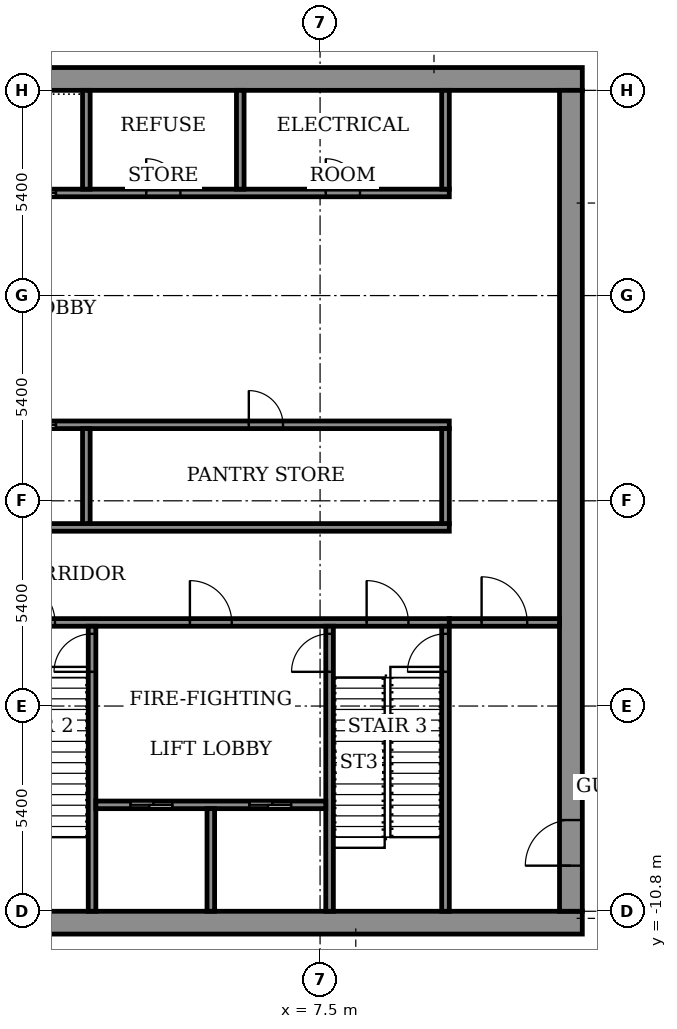
"""IFC4 building model, lengths in metres.
Left out: names, types, materials, properties, quantities, classifications, styles, units other than length and angle.
Written with IfcOpenShell. Run it as: python <this file> out.ifc"""

import sys

from ifc_helpers import new_model, si_unit, direction, frame, frame_2d, origin, place, context, subcontext, project, spatial, rectangle, extrude, element, fill, save


model = new_model("IFC4")
c1 = context("Model", 3, precision=1e-05, world=origin(), true_north=direction((0.0, 1.0)))
c2 = subcontext(c1, "Body", "Model", "MODEL_VIEW")
j1 = project(units=[si_unit("LENGTHUNIT", "METRE"), si_unit("PLANEANGLEUNIT", "RADIAN")], contexts=[c1])
p1 = place(None, origin())
s1 = spatial("IfcSite", under=j1, at=p1, CompositionType="ELEMENT")
p2 = place(p1, origin())
s2 = spatial("IfcBuilding", under=s1, at=p2, CompositionType="ELEMENT")
p3 = place(p2, frame((0.0, 0.0, 324.1)))
s3 = spatial("IfcBuildingStorey", under=s2, at=p3, CompositionType="ELEMENT", Elevation=324.1)
for number, where, z_axis, x_axis in (
    (1, (-14.4, -11.1, 0.0), (0.0, 0.0, 1.0), (1.0, 0.0, 0.0)),
    (2, (-14.4, 11.1, 0.0), (0.0, 0.0, 1.0), (1.0, 0.0, 0.0)),
):
    element("IfcWall", number, at=place(p3, frame(where, z_axis=z_axis, x_axis=x_axis)), inside=s3, PredefinedType="SHEAR", context=c2, shape_type="SweptSolid", body=[
        extrude(rectangle(XDim=28.8, YDim=0.6, at=frame_2d((14.4, 0.0))), origin(), (0.0, 0.0, 1.0), 5.6),
    ])
p4 = place(p3, frame((14.1, -10.8, 0.0), z_axis=(0.0, 0.0, 1.0), x_axis=(0.0, 1.0, 0.0)))
e3 = element("IfcWall", 3, at=p4, inside=s3, PredefinedType="SHEAR", context=c2, shape_type="SweptSolid", body=[
    extrude(rectangle(XDim=21.6, YDim=0.6, at=frame_2d((10.8, 0.0))), origin(), (0.0, 0.0, 1.0), 5.6),
])
p5 = place(p4, frame((1.2, 0.0, 0.0)))
e4 = element("IfcOpeningElement", 4, at=p5, cuts=e3, PredefinedType="OPENING", context=c2, shape_type="SweptSolid", body=[
    extrude(rectangle(XDim=1.2, YDim=2.1, at=frame_2d((0.6, 1.05))), frame((0.0, 0.31, 0.0), z_axis=(0.0, -1.0, 0.0), x_axis=(1.0, 0.0, 0.0)), (0.0, 0.0, 1.0), 0.62),
])
p6 = place(p3, frame((-10.9, -3.2, 0.0), z_axis=(0.0, 0.0, 1.0), x_axis=(1.0, 0.0, 0.0)))
e5 = element("IfcWall", 5, at=p6, inside=s3, PredefinedType="SHEAR", context=c2, shape_type="SweptSolid", body=[
    extrude(rectangle(XDim=21.8, YDim=0.2, at=frame_2d((10.9, 0.0))), origin(), (0.0, 0.0, 1.0), 5.05),
])
p7 = place(p6, frame((1.075, 0.0, 0.0)))
e6 = element("IfcOpeningElement", 6, at=p7, cuts=e5, PredefinedType="OPENING", context=c2, shape_type="SweptSolid", body=[
    extrude(rectangle(XDim=1.1, YDim=2.1, at=frame_2d((0.55, 1.05))), frame((0.0, 0.11, 0.0), z_axis=(0.0, -1.0, 0.0), x_axis=(1.0, 0.0, 0.0)), (0.0, 0.0, 1.0), 0.22),
])
p8 = place(p6, frame((10.325, 0.0, 0.0)))
e7 = element("IfcOpeningElement", 7, at=p8, cuts=e5, PredefinedType="OPENING", context=c2, shape_type="SweptSolid", body=[
    extrude(rectangle(XDim=1.1, YDim=2.1, at=frame_2d((0.55, 1.05))), frame((0.0, 0.11, 0.0), z_axis=(0.0, -1.0, 0.0), x_axis=(1.0, 0.0, 0.0)), (0.0, 0.0, 1.0), 0.22),
])
p9 = place(p6, frame((19.625, 0.0, 0.0)))
e8 = element("IfcOpeningElement", 8, at=p9, cuts=e5, PredefinedType="OPENING", context=c2, shape_type="SweptSolid", body=[
    extrude(rectangle(XDim=1.1, YDim=2.1, at=frame_2d((0.55, 1.05))), frame((0.0, 0.11, 0.0), z_axis=(0.0, -1.0, 0.0), x_axis=(1.0, 0.0, 0.0)), (0.0, 0.0, 1.0), 0.22),
])
p10 = place(p6, frame((5.7, 0.0, 0.0)))
e9 = element("IfcOpeningElement", 9, at=p10, cuts=e5, PredefinedType="OPENING", context=c2, shape_type="SweptSolid", body=[
    extrude(rectangle(XDim=1.1, YDim=2.1, at=frame_2d((0.55, 1.05))), frame((0.0, 0.11, 0.0), z_axis=(0.0, -1.0, 0.0), x_axis=(1.0, 0.0, 0.0)), (0.0, 0.0, 1.0), 0.22),
])
p11 = place(p6, frame((14.975, 0.0, 0.0)))
e10 = element("IfcOpeningElement", 10, at=p11, cuts=e5, PredefinedType="OPENING", context=c2, shape_type="SweptSolid", body=[
    extrude(rectangle(XDim=1.1, YDim=2.1, at=frame_2d((0.55, 1.05))), frame((0.0, 0.11, 0.0), z_axis=(0.0, -1.0, 0.0), x_axis=(1.0, 0.0, 0.0)), (0.0, 0.0, 1.0), 0.22),
])
p12 = place(p3, frame((-10.9, -0.7, 0.0), z_axis=(0.0, 0.0, 1.0), x_axis=(1.0, 0.0, 0.0)))
e11 = element("IfcWall", 11, at=p12, inside=s3, PredefinedType="SHEAR", context=c2, shape_type="SweptSolid", body=[
    extrude(rectangle(XDim=21.8, YDim=0.2, at=frame_2d((10.9, 0.0))), origin(), (0.0, 0.0, 1.0), 5.05),
])
p13 = place(p3, frame((-10.9, 2.0, 0.0), z_axis=(0.0, 0.0, 1.0), x_axis=(1.0, 0.0, 0.0)))
e12 = element("IfcWall", 12, at=p13, inside=s3, PredefinedType="SHEAR", context=c2, shape_type="SweptSolid", body=[
    extrude(rectangle(XDim=21.8, YDim=0.2, at=frame_2d((10.9, 0.0))), origin(), (0.0, 0.0, 1.0), 5.05),
])
p14 = place(p13, frame((4.95, 0.0, 0.0)))
e13 = element("IfcOpeningElement", 13, at=p14, cuts=e12, PredefinedType="OPENING", context=c2, shape_type="SweptSolid", body=[
    extrude(rectangle(XDim=1.1, YDim=2.1, at=frame_2d((0.55, 1.05))), frame((0.0, 0.11, 0.0), z_axis=(0.0, -1.0, 0.0), x_axis=(1.0, 0.0, 0.0)), (0.0, 0.0, 1.0), 0.22),
])
p15 = place(p13, frame((7.65, 0.0, 0.0)))
e14 = element("IfcOpeningElement", 14, at=p15, cuts=e12, PredefinedType="OPENING", context=c2, shape_type="SweptSolid", body=[
    extrude(rectangle(XDim=1.1, YDim=2.1, at=frame_2d((0.55, 1.05))), frame((0.0, 0.11, 0.0), z_axis=(0.0, -1.0, 0.0), x_axis=(1.0, 0.0, 0.0)), (0.0, 0.0, 1.0), 0.22),
])
p16 = place(p13, frame((10.35, 0.0, 0.0)))
e15 = element("IfcOpeningElement", 15, at=p16, cuts=e12, PredefinedType="OPENING", context=c2, shape_type="SweptSolid", body=[
    extrude(rectangle(XDim=1.1, YDim=2.1, at=frame_2d((0.55, 1.05))), frame((0.0, 0.11, 0.0), z_axis=(0.0, -1.0, 0.0), x_axis=(1.0, 0.0, 0.0)), (0.0, 0.0, 1.0), 0.22),
])
p17 = place(p13, frame((1.675, 0.0, 0.0)))
e16 = element("IfcOpeningElement", 16, at=p17, cuts=e12, PredefinedType="OPENING", context=c2, shape_type="SweptSolid", body=[
    extrude(rectangle(XDim=0.9, YDim=2.1, at=frame_2d((0.45, 1.05))), frame((0.0, 0.11, 0.0), z_axis=(0.0, -1.0, 0.0), x_axis=(1.0, 0.0, 0.0)), (0.0, 0.0, 1.0), 0.22),
])
p18 = place(p13, frame((16.525, 0.0, 0.0)))
e17 = element("IfcOpeningElement", 17, at=p18, cuts=e12, PredefinedType="OPENING", context=c2, shape_type="SweptSolid", body=[
    extrude(rectangle(XDim=0.9, YDim=2.1, at=frame_2d((0.45, 1.05))), frame((0.0, 0.11, 0.0), z_axis=(0.0, -1.0, 0.0), x_axis=(1.0, 0.0, 0.0)), (0.0, 0.0, 1.0), 0.22),
])
p19 = place(p3, frame((-10.9, 8.1, 0.0), z_axis=(0.0, 0.0, 1.0), x_axis=(1.0, 0.0, 0.0)))
e18 = element("IfcWall", 18, at=p19, inside=s3, PredefinedType="SHEAR", context=c2, shape_type="SweptSolid", body=[
    extrude(rectangle(XDim=21.8, YDim=0.2, at=frame_2d((10.9, 0.0))), origin(), (0.0, 0.0, 1.0), 5.05),
])
p20 = place(p19, frame((4.95, 0.0, 0.0)))
e19 = element("IfcOpeningElement", 19, at=p20, cuts=e18, PredefinedType="OPENING", context=c2, shape_type="SweptSolid", body=[
    extrude(rectangle(XDim=1.1, YDim=2.1, at=frame_2d((0.55, 1.05))), frame((0.0, 0.11, 0.0), z_axis=(0.0, -1.0, 0.0), x_axis=(1.0, 0.0, 0.0)), (0.0, 0.0, 1.0), 0.22),
])
p21 = place(p19, frame((7.65, 0.0, 0.0)))
e20 = element("IfcOpeningElement", 20, at=p21, cuts=e18, PredefinedType="OPENING", context=c2, shape_type="SweptSolid", body=[
    extrude(rectangle(XDim=1.1, YDim=2.1, at=frame_2d((0.55, 1.05))), frame((0.0, 0.11, 0.0), z_axis=(0.0, -1.0, 0.0), x_axis=(1.0, 0.0, 0.0)), (0.0, 0.0, 1.0), 0.22),
])
p22 = place(p19, frame((10.35, 0.0, 0.0)))
e21 = element("IfcOpeningElement", 21, at=p22, cuts=e18, PredefinedType="OPENING", context=c2, shape_type="SweptSolid", body=[
    extrude(rectangle(XDim=1.1, YDim=2.1, at=frame_2d((0.55, 1.05))), frame((0.0, 0.11, 0.0), z_axis=(0.0, -1.0, 0.0), x_axis=(1.0, 0.0, 0.0)), (0.0, 0.0, 1.0), 0.22),
])
p23 = place(p19, frame((1.675, 0.0, 0.0)))
e22 = element("IfcOpeningElement", 22, at=p23, cuts=e18, PredefinedType="OPENING", context=c2, shape_type="SweptSolid", body=[
    extrude(rectangle(XDim=0.9, YDim=2.1, at=frame_2d((0.45, 1.05))), frame((0.0, 0.11, 0.0), z_axis=(0.0, -1.0, 0.0), x_axis=(1.0, 0.0, 0.0)), (0.0, 0.0, 1.0), 0.22),
])
p24 = place(p19, frame((13.825, 0.0, 0.0)))
e23 = element("IfcOpeningElement", 23, at=p24, cuts=e18, PredefinedType="OPENING", context=c2, shape_type="SweptSolid", body=[
    extrude(rectangle(XDim=0.9, YDim=2.1, at=frame_2d((0.45, 1.05))), frame((0.0, 0.11, 0.0), z_axis=(0.0, -1.0, 0.0), x_axis=(1.0, 0.0, 0.0)), (0.0, 0.0, 1.0), 0.22),
])
p25 = place(p19, frame((18.55, 0.0, 0.0)))
e24 = element("IfcOpeningElement", 24, at=p25, cuts=e18, PredefinedType="OPENING", context=c2, shape_type="SweptSolid", body=[
    extrude(rectangle(XDim=0.9, YDim=2.1, at=frame_2d((0.45, 1.05))), frame((0.0, 0.11, 0.0), z_axis=(0.0, -1.0, 0.0), x_axis=(1.0, 0.0, 0.0)), (0.0, 0.0, 1.0), 0.22),
])
p26 = place(p3, frame((1.5, -10.8, 0.0), z_axis=(0.0, 0.0, 1.0), x_axis=(0.0, 1.0, 0.0)))
e25 = element("IfcWall", 25, at=p26, inside=s3, PredefinedType="SHEAR", context=c2, shape_type="SweptSolid", body=[
    extrude(rectangle(XDim=7.5, YDim=0.2, at=frame_2d((3.75, 0.0))), origin(), (0.0, 0.0, 1.0), 5.05),
])
p27 = place(p26, frame((6.3, 0.0, 0.0)))
e26 = element("IfcOpeningElement", 26, at=p27, cuts=e25, PredefinedType="OPENING", context=c2, shape_type="SweptSolid", body=[
    extrude(rectangle(XDim=1.0, YDim=2.1, at=frame_2d((0.5, 1.05))), frame((0.0, 0.11, 0.0), z_axis=(0.0, -1.0, 0.0), x_axis=(1.0, 0.0, 0.0)), (0.0, 0.0, 1.0), 0.22),
])
p28 = place(p3, frame((7.75, -10.8, 0.0), z_axis=(0.0, 0.0, 1.0), x_axis=(0.0, 1.0, 0.0)))
e27 = element("IfcWall", 27, at=p28, inside=s3, PredefinedType="SHEAR", context=c2, shape_type="SweptSolid", body=[
    extrude(rectangle(XDim=7.5, YDim=0.2, at=frame_2d((3.75, 0.0))), origin(), (0.0, 0.0, 1.0), 5.05),
])
p29 = place(p28, frame((6.3, 0.0, 0.0)))
e28 = element("IfcOpeningElement", 28, at=p29, cuts=e27, PredefinedType="OPENING", context=c2, shape_type="SweptSolid", body=[
    extrude(rectangle(XDim=1.0, YDim=2.1, at=frame_2d((0.5, 1.05))), frame((0.0, 0.11, 0.0), z_axis=(0.0, -1.0, 0.0), x_axis=(1.0, 0.0, 0.0)), (0.0, 0.0, 1.0), 0.22),
])
p30 = place(p3, frame((10.8, -10.8, 0.0), z_axis=(0.0, 0.0, 1.0), x_axis=(0.0, 1.0, 0.0)))
e29 = element("IfcWall", 29, at=p30, inside=s3, PredefinedType="SHEAR", context=c2, shape_type="SweptSolid", body=[
    extrude(rectangle(XDim=7.5, YDim=0.2, at=frame_2d((3.75, 0.0))), origin(), (0.0, 0.0, 1.0), 5.05),
])
p31 = place(p30, frame((6.3, 0.0, 0.0)))
e30 = element("IfcOpeningElement", 30, at=p31, cuts=e29, PredefinedType="OPENING", context=c2, shape_type="SweptSolid", body=[
    extrude(rectangle(XDim=1.0, YDim=2.1, at=frame_2d((0.5, 1.05))), frame((0.0, 0.11, 0.0), z_axis=(0.0, -1.0, 0.0), x_axis=(1.0, 0.0, 0.0)), (0.0, 0.0, 1.0), 0.22),
])
p32 = place(p3, frame((1.6, -8.0, 0.0), z_axis=(0.0, 0.0, 1.0), x_axis=(1.0, 0.0, 0.0)))
e31 = element("IfcWall", 31, at=p32, inside=s3, PredefinedType="SHEAR", context=c2, shape_type="SweptSolid", body=[
    extrude(rectangle(XDim=6.05, YDim=0.2, at=frame_2d((3.025, 0.0))), origin(), (0.0, 0.0, 1.0), 5.05),
])
p33 = place(p32, frame((0.913, 0.0, 0.0)))
e32 = element("IfcOpeningElement", 32, at=p33, cuts=e31, PredefinedType="OPENING", context=c2, shape_type="SweptSolid", body=[
    extrude(rectangle(XDim=1.1, YDim=2.1, at=frame_2d((0.55, 1.05))), frame((0.0, 0.11, 0.0), z_axis=(0.0, -1.0, 0.0), x_axis=(1.0, 0.0, 0.0)), (0.0, 0.0, 1.0), 0.22),
])
p34 = place(p32, frame((4.038, 0.0, 0.0)))
e33 = element("IfcOpeningElement", 33, at=p34, cuts=e31, PredefinedType="OPENING", context=c2, shape_type="SweptSolid", body=[
    extrude(rectangle(XDim=1.1, YDim=2.1, at=frame_2d((0.55, 1.05))), frame((0.0, 0.11, 0.0), z_axis=(0.0, -1.0, 0.0), x_axis=(1.0, 0.0, 0.0)), (0.0, 0.0, 1.0), 0.22),
])
p35 = place(p3, frame((4.625, -10.8, 0.0), z_axis=(0.0, 0.0, 1.0), x_axis=(0.0, 1.0, 0.0)))
e34 = element("IfcWall", 34, at=p35, inside=s3, PredefinedType="SHEAR", context=c2, shape_type="SweptSolid", body=[
    extrude(rectangle(XDim=2.7, YDim=0.2, at=frame_2d((1.35, 0.0))), origin(), (0.0, 0.0, 1.0), 5.05),
])
p36 = place(p3, frame((1.35, -0.6, 0.0), z_axis=(0.0, 0.0, 1.0), x_axis=(0.0, 1.0, 0.0)))
e35 = element("IfcWall", 35, at=p36, inside=s3, PredefinedType="SHEAR", context=c2, shape_type="SweptSolid", body=[
    extrude(rectangle(XDim=2.5, YDim=0.2, at=frame_2d((1.25, 0.0))), origin(), (0.0, 0.0, 1.0), 5.05),
])
p37 = place(p3, frame((10.8, -0.6, 0.0), z_axis=(0.0, 0.0, 1.0), x_axis=(0.0, 1.0, 0.0)))
e36 = element("IfcWall", 36, at=p37, inside=s3, PredefinedType="STANDARD", context=c2, shape_type="SweptSolid", body=[
    extrude(rectangle(XDim=2.5, YDim=0.2, at=frame_2d((1.25, 0.0))), origin(), (0.0, 0.0, 1.0), 5.05),
])
p38 = place(p3, frame((1.35, 8.2, 0.0), z_axis=(0.0, 0.0, 1.0), x_axis=(0.0, 1.0, 0.0)))
e37 = element("IfcWall", 37, at=p38, inside=s3, PredefinedType="SHEAR", context=c2, shape_type="SweptSolid", body=[
    extrude(rectangle(XDim=2.6, YDim=0.2, at=frame_2d((1.3, 0.0))), origin(), (0.0, 0.0, 1.0), 5.05),
])
for number, where, z_axis, x_axis in (
    (38, (5.4, 8.2, 0.0), (0.0, 0.0, 1.0), (0.0, 1.0, 0.0)),
    (39, (10.8, 8.2, 0.0), (0.0, 0.0, 1.0), (0.0, 1.0, 0.0)),
):
    element("IfcWall", number, at=place(p3, frame(where, z_axis=z_axis, x_axis=x_axis)), inside=s3, PredefinedType="STANDARD", context=c2, shape_type="SweptSolid", body=[
        extrude(rectangle(XDim=2.6, YDim=0.2, at=frame_2d((1.3, 0.0))), origin(), (0.0, 0.0, 1.0), 5.05),
    ])
p39 = place(p3, frame((10.9, -3.2, 0.0), z_axis=(0.0, 0.0, 1.0), x_axis=(1.0, 0.0, 0.0)))
e40 = element("IfcWall", 40, at=p39, inside=s3, PredefinedType="STANDARD", context=c2, shape_type="SweptSolid", body=[
    extrude(rectangle(XDim=2.9, YDim=0.2, at=frame_2d((1.45, 0.0))), origin(), (0.0, 0.0, 1.0), 5.05),
])
p40 = place(p39, frame((0.85, 0.0, 0.0)))
e41 = element("IfcOpeningElement", 41, at=p40, cuts=e40, PredefinedType="OPENING", context=c2, shape_type="SweptSolid", body=[
    extrude(rectangle(XDim=1.2, YDim=2.1, at=frame_2d((0.6, 1.05))), frame((0.0, 0.11, 0.0), z_axis=(0.0, -1.0, 0.0), x_axis=(1.0, 0.0, 0.0)), (0.0, 0.0, 1.0), 0.22),
])
p41 = place(p5, origin())
e42 = element("IfcDoor", 42, at=p41, inside=s3, OperationType="DOUBLE_DOOR_SINGLE_SWING", PredefinedType="DOOR", context=c2, shape_type="SweptSolid", body=[
    extrude(rectangle(XDim=1.2, YDim=2.1, at=frame_2d((0.6, 1.05))), frame((0.0, 0.025, 0.0), z_axis=(0.0, -1.0, 0.0), x_axis=(1.0, 0.0, 0.0)), (0.0, 0.0, 1.0), 0.05),
])
fill(e4, e42)
p42 = place(p16, origin())
e43 = element("IfcDoor", 43, at=p42, inside=s3, OperationType="SLIDING_TO_LEFT", PredefinedType="DOOR", context=c2, shape_type="SweptSolid", body=[
    extrude(rectangle(XDim=1.1, YDim=2.1, at=frame_2d((0.55, 1.05))), frame((0.0, 0.025, 0.0), z_axis=(0.0, -1.0, 0.0), x_axis=(1.0, 0.0, 0.0)), (0.0, 0.0, 1.0), 0.05),
])
fill(e15, e43)
p43 = place(p22, origin())
e44 = element("IfcDoor", 44, at=p43, inside=s3, OperationType="SLIDING_TO_LEFT", PredefinedType="DOOR", context=c2, shape_type="SweptSolid", body=[
    extrude(rectangle(XDim=1.1, YDim=2.1, at=frame_2d((0.55, 1.05))), frame((0.0, 0.025, 0.0), z_axis=(0.0, -1.0, 0.0), x_axis=(1.0, 0.0, 0.0)), (0.0, 0.0, 1.0), 0.05),
])
fill(e21, e44)
p44 = place(p18, origin())
e45 = element("IfcDoor", 45, at=p44, inside=s3, OperationType="SINGLE_SWING_RIGHT", PredefinedType="DOOR", context=c2, shape_type="SweptSolid", body=[
    extrude(rectangle(XDim=0.9, YDim=2.1, at=frame_2d((0.45, 1.05))), frame((0.0, 0.025, 0.0), z_axis=(0.0, -1.0, 0.0), x_axis=(1.0, 0.0, 0.0)), (0.0, 0.0, 1.0), 0.05),
])
fill(e17, e45)
p45 = place(p24, origin())
e46 = element("IfcDoor", 46, at=p45, inside=s3, OperationType="SINGLE_SWING_RIGHT", PredefinedType="DOOR", context=c2, shape_type="SweptSolid", body=[
    extrude(rectangle(XDim=0.9, YDim=2.1, at=frame_2d((0.45, 1.05))), frame((0.0, 0.025, 0.0), z_axis=(0.0, -1.0, 0.0), x_axis=(1.0, 0.0, 0.0)), (0.0, 0.0, 1.0), 0.05),
])
fill(e23, e46)
p46 = place(p25, origin())
e47 = element("IfcDoor", 47, at=p46, inside=s3, OperationType="SINGLE_SWING_LEFT", PredefinedType="DOOR", context=c2, shape_type="SweptSolid", body=[
    extrude(rectangle(XDim=0.9, YDim=2.1, at=frame_2d((0.45, 1.05))), frame((0.0, 0.025, 0.0), z_axis=(0.0, -1.0, 0.0), x_axis=(1.0, 0.0, 0.0)), (0.0, 0.0, 1.0), 0.05),
])
fill(e24, e47)
p47 = place(p33, origin())
e48 = element("IfcDoor", 48, at=p47, inside=s3, OperationType="SLIDING_TO_LEFT", PredefinedType="DOOR", context=c2, shape_type="SweptSolid", body=[
    extrude(rectangle(XDim=1.1, YDim=2.1, at=frame_2d((0.55, 1.05))), frame((0.0, 0.025, 0.0), z_axis=(0.0, -1.0, 0.0), x_axis=(1.0, 0.0, 0.0)), (0.0, 0.0, 1.0), 0.05),
])
fill(e32, e48)
p48 = place(p34, origin())
e49 = element("IfcDoor", 49, at=p48, inside=s3, OperationType="SLIDING_TO_LEFT", PredefinedType="DOOR", context=c2, shape_type="SweptSolid", body=[
    extrude(rectangle(XDim=1.1, YDim=2.1, at=frame_2d((0.55, 1.05))), frame((0.0, 0.025, 0.0), z_axis=(0.0, -1.0, 0.0), x_axis=(1.0, 0.0, 0.0)), (0.0, 0.0, 1.0), 0.05),
])
fill(e33, e49)
p49 = place(p8, origin())
e50 = element("IfcDoor", 50, at=p49, inside=s3, OperationType="SINGLE_SWING_RIGHT", PredefinedType="DOOR", context=c2, shape_type="SweptSolid", body=[
    extrude(rectangle(XDim=1.1, YDim=2.1, at=frame_2d((0.55, 1.05))), frame((0.0, 0.025, 0.0), z_axis=(0.0, -1.0, 0.0), x_axis=(1.0, 0.0, 0.0)), (0.0, 0.0, 1.0), 0.05),
])
fill(e7, e50)
p50 = place(p9, origin())
e51 = element("IfcDoor", 51, at=p50, inside=s3, OperationType="SINGLE_SWING_RIGHT", PredefinedType="DOOR", context=c2, shape_type="SweptSolid", body=[
    extrude(rectangle(XDim=1.1, YDim=2.1, at=frame_2d((0.55, 1.05))), frame((0.0, 0.025, 0.0), z_axis=(0.0, -1.0, 0.0), x_axis=(1.0, 0.0, 0.0)), (0.0, 0.0, 1.0), 0.05),
])
fill(e8, e51)
p51 = place(p11, origin())
e52 = element("IfcDoor", 52, at=p51, inside=s3, OperationType="SINGLE_SWING_LEFT", PredefinedType="DOOR", context=c2, shape_type="SweptSolid", body=[
    extrude(rectangle(XDim=1.1, YDim=2.1, at=frame_2d((0.55, 1.05))), frame((0.0, 0.025, 0.0), z_axis=(0.0, -1.0, 0.0), x_axis=(1.0, 0.0, 0.0)), (0.0, 0.0, 1.0), 0.05),
])
fill(e10, e52)
p52 = place(p27, origin())
e53 = element("IfcDoor", 53, at=p52, inside=s3, OperationType="SINGLE_SWING_RIGHT", PredefinedType="DOOR", context=c2, shape_type="SweptSolid", body=[
    extrude(rectangle(XDim=1.0, YDim=2.1, at=frame_2d((0.5, 1.05))), frame((0.0, 0.025, 0.0), z_axis=(0.0, -1.0, 0.0), x_axis=(1.0, 0.0, 0.0)), (0.0, 0.0, 1.0), 0.05),
])
fill(e26, e53)
p53 = place(p29, origin())
e54 = element("IfcDoor", 54, at=p53, inside=s3, OperationType="SINGLE_SWING_RIGHT", PredefinedType="DOOR", context=c2, shape_type="SweptSolid", body=[
    extrude(rectangle(XDim=1.0, YDim=2.1, at=frame_2d((0.5, 1.05))), frame((0.0, 0.025, 0.0), z_axis=(0.0, -1.0, 0.0), x_axis=(1.0, 0.0, 0.0)), (0.0, 0.0, 1.0), 0.05),
])
fill(e28, e54)
p54 = place(p40, origin())
e55 = element("IfcDoor", 55, at=p54, inside=s3, OperationType="SINGLE_SWING_LEFT", PredefinedType="DOOR", context=c2, shape_type="SweptSolid", body=[
    extrude(rectangle(XDim=1.2, YDim=2.1, at=frame_2d((0.6, 1.05))), frame((0.0, 0.025, 0.0), z_axis=(0.0, -1.0, 0.0), x_axis=(1.0, 0.0, 0.0)), (0.0, 0.0, 1.0), 0.05),
])
fill(e41, e55)
p55 = place(p31, origin())
e56 = element("IfcDoor", 56, at=p55, inside=s3, OperationType="SINGLE_SWING_RIGHT", PredefinedType="DOOR", context=c2, shape_type="SweptSolid", body=[
    extrude(rectangle(XDim=1.0, YDim=2.1, at=frame_2d((0.5, 1.05))), frame((0.0, 0.025, 0.0), z_axis=(0.0, -1.0, 0.0), x_axis=(1.0, 0.0, 0.0)), (0.0, 0.0, 1.0), 0.05),
])
fill(e30, e56)
save(model, sys.argv[1])
